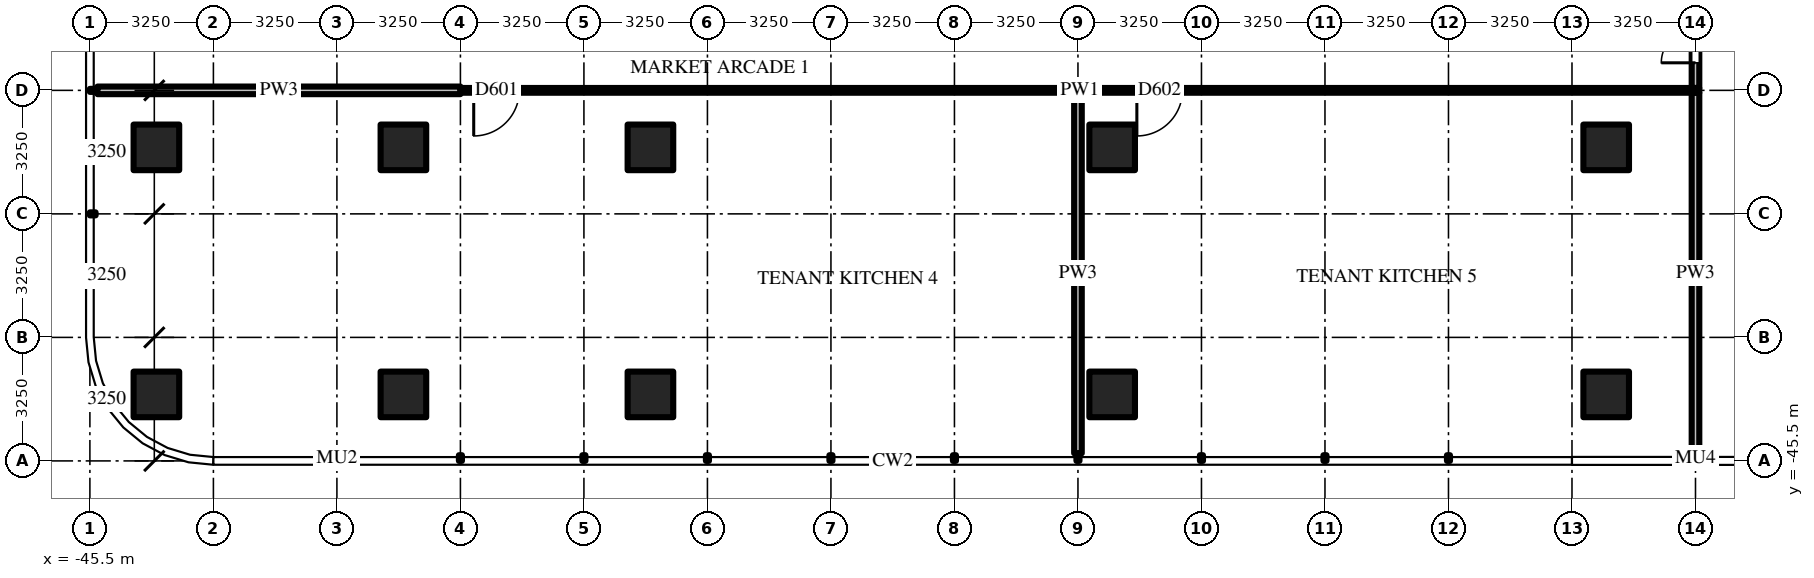
"""IFC4 building model, lengths in metres.
Left out: names, types, materials, properties, quantities, classifications, styles, units other than length and angle.
Written with IfcOpenShell. Run it as: python <this file> out.ifc"""

import sys

from ifc_helpers import new_model, si_unit, direction, frame, frame_2d, origin, origin_2d, place, context, subcontext, project, spatial, rectangle, extrude, source, transform, mapped, element, fill, save


model = new_model("IFC4")
c1 = context("Model", 3, precision=1e-05, world=origin(), true_north=direction((0.0, 1.0)))
c2 = subcontext(c1, "Body", "Model", "MODEL_VIEW")
j1 = project(units=[si_unit("LENGTHUNIT", "METRE"), si_unit("PLANEANGLEUNIT", "RADIAN")], contexts=[c1])
p1 = place(None, origin())
s1 = spatial("IfcSite", under=j1, at=p1, CompositionType="ELEMENT")
p2 = place(p1, origin())
s2 = spatial("IfcBuilding", under=s1, at=p2, CompositionType="ELEMENT")
p3 = place(p2, frame((0.0, 0.0, 8.0)))
s3 = spatial("IfcBuildingStorey", under=s2, at=p3, CompositionType="ELEMENT", Elevation=8.0)
m1 = source(origin(), c2, "Body", "SweptSolid", [
    extrude(rectangle(XDim=1.2, YDim=1.2, at=origin_2d()), origin(), (0.0, 0.0, 1.0), 6.0),
])
for number, where, z_axis, x_axis in (
    (1, (-5.6, -37.25, 0.0), (0.0, 0.0, 1.0), (1.0, 0.0, 0.0)),
    (2, (-5.6, -43.75, 0.0), (0.0, 0.0, 1.0), (1.0, 0.0, 0.0)),
    (3, (-18.6, -37.25, 0.0), (0.0, 0.0, 1.0), (1.0, 0.0, 0.0)),
    (4, (-18.6, -43.75, 0.0), (0.0, 0.0, 1.0), (1.0, 0.0, 0.0)),
    (5, (-30.75, -37.25, 0.0), (0.0, 0.0, 1.0), (1.0, 0.0, 0.0)),
    (6, (-30.75, -43.75, 0.0), (0.0, 0.0, 1.0), (1.0, 0.0, 0.0)),
    (7, (-37.25, -37.25, 0.0), (0.0, 0.0, 1.0), (1.0, 0.0, 0.0)),
    (8, (-37.25, -43.75, 0.0), (0.0, 0.0, 1.0), (1.0, 0.0, 0.0)),
    (9, (-43.75, -37.25, 0.0), (0.0, 0.0, 1.0), (1.0, 0.0, 0.0)),
    (10, (-43.75, -43.75, 0.0), (0.0, 0.0, 1.0), (1.0, 0.0, 0.0)),
):
    element("IfcColumn", number, at=place(p3, frame(where, z_axis=z_axis, x_axis=x_axis)), inside=s3, PredefinedType="COLUMN", context=c2, shape_type="MappedRepresentation", body=[
        mapped(m1, transform((0.0, 0.0, 0.0))),
    ])
m2 = source(origin(), c2, "Body", "SweptSolid", [
    extrude(rectangle(XDim=9.488, YDim=0.2, at=frame_2d((4.744, 0.0))), origin(), (0.0, 0.0, 1.0), 4.839),
])
p4 = place(p3, frame((-19.5, -45.3, 0.0), z_axis=(0.0, 0.0, 1.0), x_axis=(0.0, 1.0, 0.0)))
e11 = element("IfcWall", 11, at=p4, inside=s3, PredefinedType="PARTITIONING", context=c2, shape_type="MappedRepresentation", body=[
    mapped(m2, transform((0.0, 0.0, 0.0))),
])
m3 = source(origin(), c2, "Body", "SweptSolid", [
    extrude(rectangle(XDim=3.188, YDim=0.2, at=frame_2d((1.594, 0.0))), origin(), (0.0, 0.0, 1.0), 4.997),
])
p5 = place(p3, frame((-3.25, -35.688, 0.0), z_axis=(0.0, 0.0, 1.0), x_axis=(0.0, 1.0, 0.0)))
e12 = element("IfcWall", 12, at=p5, inside=s3, PredefinedType="PARTITIONING", context=c2, shape_type="MappedRepresentation", body=[
    mapped(m3, transform((0.0, 0.0, 0.0))),
])
m4 = source(origin(), c2, "Body", "SweptSolid", [
    extrude(rectangle(XDim=1.8, YDim=2.1, at=frame_2d((0.9, 1.05))), frame((0.0, 0.11, 0.0), z_axis=(0.0, -1.0, 0.0), x_axis=(1.0, 0.0, 0.0)), (0.0, 0.0, 1.0), 0.22),
])
p6 = place(p5, frame((0.663, 0.0, 0.0)))
e13 = element("IfcOpeningElement", 13, at=p6, cuts=e12, PredefinedType="OPENING", context=c2, shape_type="MappedRepresentation", body=[
    mapped(m4, transform((0.0, 0.0, 0.0))),
])
m5 = source(origin(), c2, "Body", "SweptSolid", [
    extrude(rectangle(XDim=9.488, YDim=0.2, at=frame_2d((4.744, 0.0))), origin(), (0.0, 0.0, 1.0), 4.918),
])
p7 = place(p3, frame((-3.25, -45.3, 0.0), z_axis=(0.0, 0.0, 1.0), x_axis=(0.0, 1.0, 0.0)))
e14 = element("IfcWall", 14, at=p7, inside=s3, PredefinedType="PARTITIONING", context=c2, shape_type="MappedRepresentation", body=[
    mapped(m5, transform((0.0, 0.0, 0.0))),
])
m6 = source(origin(), c2, "Body", "SweptSolid", [
    extrude(rectangle(XDim=9.55, YDim=0.2, at=frame_2d((4.775, 0.0))), origin(), (0.0, 0.0, 1.0), 4.997),
])
p8 = place(p3, frame((-45.3, -35.75, 0.0), z_axis=(0.0, 0.0, 1.0), x_axis=(1.0, 0.0, 0.0)))
e15 = element("IfcWall", 15, at=p8, inside=s3, PredefinedType="PARTITIONING", context=c2, shape_type="MappedRepresentation", body=[
    mapped(m6, transform((0.0, 0.0, 0.0))),
])
p9 = place(p3, frame((-3.15, -35.75, 0.0), z_axis=(0.0, 0.0, 1.0), x_axis=(-1.0, 0.0, 0.0)))
e16 = element("IfcWall", 16, at=p9, inside=s3, PredefinedType="PARTITIONING", context=c2, shape_type="SweptSolid", body=[
    extrude(rectangle(XDim=32.6, YDim=0.125, at=frame_2d((16.3, 0.0))), origin(), (0.0, 0.0, 1.0), 4.997),
])
m7 = source(origin(), c2, "Body", "SweptSolid", [
    extrude(rectangle(XDim=1.2, YDim=2.1, at=frame_2d((0.6, 1.05))), frame((0.0, 0.073, 0.0), z_axis=(0.0, -1.0, 0.0), x_axis=(1.0, 0.0, 0.0)), (0.0, 0.0, 1.0), 0.145),
])
p10 = place(p9, frame((31.05, 0.0, 0.0)))
e17 = element("IfcOpeningElement", 17, at=p10, cuts=e16, PredefinedType="OPENING", context=c2, shape_type="MappedRepresentation", body=[
    mapped(m7, transform((0.0, 0.0, 0.0))),
])
p11 = place(p9, frame((13.6, 0.0, 0.0)))
e18 = element("IfcOpeningElement", 18, at=p11, cuts=e16, PredefinedType="OPENING", context=c2, shape_type="MappedRepresentation", body=[
    mapped(m7, transform((0.0, 0.0, 0.0))),
])
m8 = source(origin(), c2, "Body", "SweptSolid", [
    extrude(rectangle(XDim=1.2, YDim=2.1, at=frame_2d((0.6, 1.05))), frame((0.0, 0.025, 0.0), z_axis=(0.0, -1.0, 0.0), x_axis=(1.0, 0.0, 0.0)), (0.0, 0.0, 1.0), 0.05),
])
p12 = place(p10, origin())
e19 = element("IfcDoor", 19, at=p12, inside=s3, OperationType="SINGLE_SWING_RIGHT", PredefinedType="DOOR", context=c2, shape_type="MappedRepresentation", body=[
    mapped(m8, transform((0.0, 0.0, 0.0))),
])
fill(e17, e19)
p13 = place(p11, origin())
e20 = element("IfcDoor", 20, at=p13, inside=s3, OperationType="SINGLE_SWING_RIGHT", PredefinedType="DOOR", context=c2, shape_type="MappedRepresentation", body=[
    mapped(m8, transform((0.0, 0.0, 0.0))),
])
fill(e18, e20)
m9 = source(origin(), c2, "Body", "SweptSolid", [
    extrude(rectangle(XDim=1.8, YDim=2.1, at=frame_2d((0.9, 1.05))), frame((0.0, 0.025, 0.0), z_axis=(0.0, -1.0, 0.0), x_axis=(1.0, 0.0, 0.0)), (0.0, 0.0, 1.0), 0.05),
])
p14 = place(p6, origin())
e21 = element("IfcDoor", 21, at=p14, inside=s3, OperationType="DOUBLE_DOOR_SINGLE_SWING", PredefinedType="DOOR", context=c2, shape_type="MappedRepresentation", body=[
    mapped(m9, transform((0.0, 0.0, 0.0))),
])
fill(e13, e21)
save(model, sys.argv[1])
